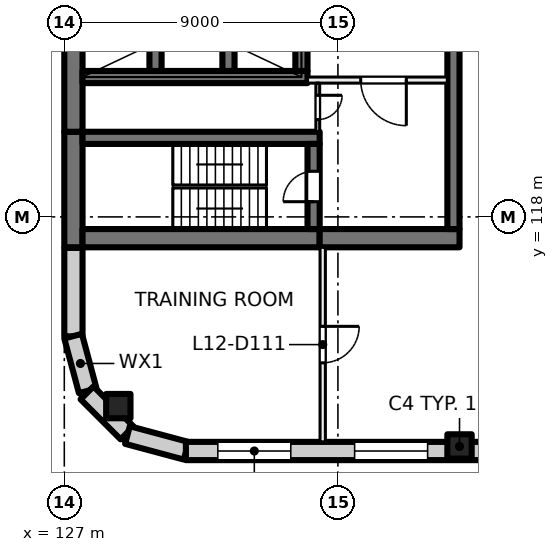
"""IFC4 building model, lengths in metres.
Left out: names, types, materials, properties, quantities, classifications, styles, units other than length and angle.
Written with IfcOpenShell. Run it as: python <this file> out.ifc"""

import sys

from ifc_helpers import new_model, si_unit, direction, frame, frame_2d, origin, origin_2d, place, context, subcontext, project, spatial, rectangle, extrude, element, fill, save


model = new_model("IFC4")
c1 = context("Model", 3, precision=1e-05, world=origin(), true_north=direction((0.0, 1.0)))
c2 = subcontext(c1, "Body", "Model", "MODEL_VIEW")
j1 = project(units=[si_unit("LENGTHUNIT", "METRE"), si_unit("PLANEANGLEUNIT", "RADIAN")], contexts=[c1])
p1 = place(None, origin())
s1 = spatial("IfcSite", under=j1, at=p1, CompositionType="ELEMENT")
p2 = place(p1, origin())
s2 = spatial("IfcBuilding", under=s1, at=p2, CompositionType="ELEMENT")
p3 = place(p2, frame((0.0, 0.0, 55.5)))
s3 = spatial("IfcBuildingStorey", under=s2, at=p3, CompositionType="ELEMENT", Elevation=55.5)
for number, where, z_axis, x_axis in (
    (1, (128.777, 111.777, 0.0), (0.0, 0.0, 1.0), (1.0, 0.0, 0.0)),
    (2, (140.0, 110.45, 0.0), (0.0, 0.0, 1.0), (1.0, 0.0, 0.0)),
):
    element("IfcColumn", number, at=place(p3, frame(where, z_axis=z_axis, x_axis=x_axis)), inside=s3, PredefinedType="COLUMN", context=c2, shape_type="SweptSolid", body=[
        extrude(rectangle(XDim=0.8, YDim=0.8, at=origin_2d()), origin(), (0.0, 0.0, 1.0), 4.0),
    ])
p4 = place(p3, frame((127.3, 117.0, 0.0), z_axis=(0.0, 0.0, 1.0), x_axis=(0.0, 1.0, 0.0)))
e3 = element("IfcWall", 3, at=p4, inside=s3, PredefinedType="SHEAR", context=c2, shape_type="SweptSolid", body=[
    extrude(rectangle(XDim=3.8, YDim=0.6, at=frame_2d((1.9, 0.0))), origin(), (0.0, 0.0, 1.0), 4.0),
])
p5 = place(p3, frame((127.3, 120.8, 0.0), z_axis=(0.0, 0.0, 1.0), x_axis=(0.0, 1.0, 0.0)))
e4 = element("IfcWall", 4, at=p5, inside=s3, PredefinedType="SHEAR", context=c2, shape_type="SweptSolid", body=[
    extrude(rectangle(XDim=14.4, YDim=0.6, at=frame_2d((7.2, 0.0))), origin(), (0.0, 0.0, 1.0), 4.0),
])
p6 = place(p3, frame((127.6, 117.3, 0.0), z_axis=(0.0, 0.0, 1.0), x_axis=(1.0, 0.0, 0.0)))
e5 = element("IfcWall", 5, at=p6, inside=s3, PredefinedType="SHEAR", context=c2, shape_type="SweptSolid", body=[
    extrude(rectangle(XDim=7.8, YDim=0.6, at=frame_2d((3.9, 0.0))), origin(), (0.0, 0.0, 1.0), 4.0),
])
p7 = place(p3, frame((135.4, 117.3, 0.0), z_axis=(0.0, 0.0, 1.0), x_axis=(1.0, 0.0, 0.0)))
e6 = element("IfcWall", 6, at=p7, inside=s3, PredefinedType="SHEAR", context=c2, shape_type="SweptSolid", body=[
    extrude(rectangle(XDim=4.6, YDim=0.6, at=frame_2d((2.3, 0.0))), origin(), (0.0, 0.0, 1.0), 4.0),
])
p8 = place(p3, frame((127.6, 120.6, 0.0), z_axis=(0.0, 0.0, 1.0), x_axis=(1.0, 0.0, 0.0)))
e7 = element("IfcWall", 7, at=p8, inside=s3, PredefinedType="SHEAR", context=c2, shape_type="SweptSolid", body=[
    extrude(rectangle(XDim=7.8, YDim=0.4, at=frame_2d((3.9, 0.0))), origin(), (0.0, 0.0, 1.0), 4.0),
])
p9 = place(p3, frame((135.2, 117.6, 0.0), z_axis=(0.0, 0.0, 1.0), x_axis=(0.0, 1.0, 0.0)))
e8 = element("IfcWall", 8, at=p9, inside=s3, PredefinedType="SHEAR", context=c2, shape_type="SweptSolid", body=[
    extrude(rectangle(XDim=2.8, YDim=0.4, at=frame_2d((1.4, 0.0))), origin(), (0.0, 0.0, 1.0), 4.0),
])
p10 = place(p9, frame((0.9, 0.0, 0.0)))
e9 = element("IfcOpeningElement", 9, at=p10, cuts=e8, PredefinedType="OPENING", context=c2, shape_type="SweptSolid", body=[
    extrude(rectangle(XDim=1.0, YDim=2.1, at=frame_2d((0.5, 1.05))), frame((0.0, 0.21, 0.0), z_axis=(0.0, -1.0, 0.0), x_axis=(1.0, 0.0, 0.0)), (0.0, 0.0, 1.0), 0.42),
])
p11 = place(p3, frame((127.6, 122.6, 0.0), z_axis=(0.0, 0.0, 1.0), x_axis=(1.0, 0.0, 0.0)))
e10 = element("IfcWall", 10, at=p11, inside=s3, PredefinedType="SHEAR", context=c2, shape_type="SweptSolid", body=[
    extrude(rectangle(XDim=7.4, YDim=0.4, at=frame_2d((3.7, 0.0))), origin(), (0.0, 0.0, 1.0), 4.0),
])
for number, where, z_axis, x_axis in (
    (11, (130.0, 122.8, 0.0), (0.0, 0.0, 1.0), (0.0, 1.0, 0.0)),
    (12, (132.4, 122.8, 0.0), (0.0, 0.0, 1.0), (0.0, 1.0, 0.0)),
    (13, (134.8, 122.8, 0.0), (0.0, 0.0, 1.0), (0.0, 1.0, 0.0)),
):
    element("IfcWall", number, at=place(p3, frame(where, z_axis=z_axis, x_axis=x_axis)), inside=s3, PredefinedType="SHEAR", context=c2, shape_type="SweptSolid", body=[
        extrude(rectangle(XDim=3.0, YDim=0.4, at=frame_2d((1.5, 0.0))), origin(), (0.0, 0.0, 1.0), 4.0),
    ])
p12 = place(p3, frame((139.8, 117.6, 0.0), z_axis=(0.0, 0.0, 1.0), x_axis=(0.0, 1.0, 0.0)))
e14 = element("IfcWall", 14, at=p12, inside=s3, PredefinedType="SHEAR", context=c2, shape_type="SweptSolid", body=[
    extrude(rectangle(XDim=8.6, YDim=0.4, at=frame_2d((4.3, 0.0))), origin(), (0.0, 0.0, 1.0), 4.0),
])
p13 = place(p3, frame((127.3, 114.07, 0.0), z_axis=(0.0, 0.0, 1.0), x_axis=(0.0, 1.0, 0.0)))
e15 = element("IfcWall", 15, at=p13, inside=s3, PredefinedType="SOLIDWALL", context=c2, shape_type="SweptSolid", body=[
    extrude(rectangle(XDim=2.91, YDim=0.6, at=frame_2d((1.455, 0.0))), origin(), (0.0, 0.0, 1.0), 3.625),
])
for number, where, z_axis, x_axis in (
    (16, (127.771, 112.281, 0.0), (0.0, 0.0, 1.0), (-0.259, 0.966, 0.0)),
    (17, (129.064, 110.896, 0.0), (0.0, 0.0, 1.0), (-0.707, 0.707, 0.0)),
):
    element("IfcWall", number, at=place(p3, frame(where, z_axis=z_axis, x_axis=x_axis)), inside=s3, PredefinedType="SOLIDWALL", context=c2, shape_type="SweptSolid", body=[
        extrude(rectangle(XDim=1.861, YDim=0.6, at=frame_2d((0.93, 0.0))), origin(), (0.0, 0.0, 1.0), 3.625),
    ])
p14 = place(p3, frame((131.01, 110.308, 0.0), z_axis=(0.0, 0.0, 1.0), x_axis=(-0.965920269068, 0.258839784042, 0.0)))
e18 = element("IfcWall", 18, at=p14, inside=s3, PredefinedType="SOLIDWALL", context=c2, shape_type="SweptSolid", body=[
    extrude(rectangle(XDim=2.0, YDim=0.6, at=frame_2d((1.0, 0.0))), origin(), (0.0, 0.0, 1.0), 3.625),
])
p15 = place(p3, frame((162.93, 110.3, 0.0), z_axis=(0.0, 0.0, 1.0), x_axis=(-1.0, 0.0, 0.0)))
e19 = element("IfcWall", 19, at=p15, inside=s3, PredefinedType="SOLIDWALL", context=c2, shape_type="SweptSolid", body=[
    extrude(rectangle(XDim=31.93, YDim=0.6, at=frame_2d((15.965, 0.0))), origin(), (0.0, 0.0, 1.0), 3.625),
])
p16 = place(p15, frame((1.48, 0.0, 0.9)))
e20 = element("IfcOpeningElement", 20, at=p16, cuts=e19, PredefinedType="OPENING", context=c2, shape_type="SweptSolid", body=[
    extrude(rectangle(XDim=2.4, YDim=2.4, at=frame_2d((1.2, 1.2))), frame((0.0, 0.31, 0.0), z_axis=(0.0, -1.0, 0.0), x_axis=(1.0, 0.0, 0.0)), (0.0, 0.0, 1.0), 0.62),
])
p17 = place(p15, frame((5.98, 0.0, 0.9)))
e21 = element("IfcOpeningElement", 21, at=p17, cuts=e19, PredefinedType="OPENING", context=c2, shape_type="SweptSolid", body=[
    extrude(rectangle(XDim=2.4, YDim=2.4, at=frame_2d((1.2, 1.2))), frame((0.0, 0.31, 0.0), z_axis=(0.0, -1.0, 0.0), x_axis=(1.0, 0.0, 0.0)), (0.0, 0.0, 1.0), 0.62),
])
p18 = place(p15, frame((10.48, 0.0, 0.9)))
e22 = element("IfcOpeningElement", 22, at=p18, cuts=e19, PredefinedType="OPENING", context=c2, shape_type="SweptSolid", body=[
    extrude(rectangle(XDim=2.4, YDim=2.4, at=frame_2d((1.2, 1.2))), frame((0.0, 0.31, 0.0), z_axis=(0.0, -1.0, 0.0), x_axis=(1.0, 0.0, 0.0)), (0.0, 0.0, 1.0), 0.62),
])
p19 = place(p15, frame((14.98, 0.0, 0.9)))
e23 = element("IfcOpeningElement", 23, at=p19, cuts=e19, PredefinedType="OPENING", context=c2, shape_type="SweptSolid", body=[
    extrude(rectangle(XDim=2.4, YDim=2.4, at=frame_2d((1.2, 1.2))), frame((0.0, 0.31, 0.0), z_axis=(0.0, -1.0, 0.0), x_axis=(1.0, 0.0, 0.0)), (0.0, 0.0, 1.0), 0.62),
])
p20 = place(p15, frame((19.48, 0.0, 0.9)))
e24 = element("IfcOpeningElement", 24, at=p20, cuts=e19, PredefinedType="OPENING", context=c2, shape_type="SweptSolid", body=[
    extrude(rectangle(XDim=2.4, YDim=2.4, at=frame_2d((1.2, 1.2))), frame((0.0, 0.31, 0.0), z_axis=(0.0, -1.0, 0.0), x_axis=(1.0, 0.0, 0.0)), (0.0, 0.0, 1.0), 0.62),
])
p21 = place(p15, frame((23.98, 0.0, 0.9)))
e25 = element("IfcOpeningElement", 25, at=p21, cuts=e19, PredefinedType="OPENING", context=c2, shape_type="SweptSolid", body=[
    extrude(rectangle(XDim=2.4, YDim=2.4, at=frame_2d((1.2, 1.2))), frame((0.0, 0.31, 0.0), z_axis=(0.0, -1.0, 0.0), x_axis=(1.0, 0.0, 0.0)), (0.0, 0.0, 1.0), 0.62),
])
p22 = place(p15, frame((28.48, 0.0, 0.9)))
e26 = element("IfcOpeningElement", 26, at=p22, cuts=e19, PredefinedType="OPENING", context=c2, shape_type="SweptSolid", body=[
    extrude(rectangle(XDim=2.4, YDim=2.4, at=frame_2d((1.2, 1.2))), frame((0.0, 0.31, 0.0), z_axis=(0.0, -1.0, 0.0), x_axis=(1.0, 0.0, 0.0)), (0.0, 0.0, 1.0), 0.62),
])
p23 = place(p3, frame((139.6, 122.5, 0.0), z_axis=(0.0, 0.0, 1.0), x_axis=(-1.0, 0.0, 0.0)))
e27 = element("IfcWall", 27, at=p23, inside=s3, PredefinedType="PARTITIONING", context=c2, shape_type="SweptSolid", body=[
    extrude(rectangle(XDim=4.6, YDim=0.2, at=frame_2d((2.3, 0.0))), origin(), (0.0, 0.0, 1.0), 3.625),
])
p24 = place(p23, frame((1.35, 0.0, 0.0)))
e28 = element("IfcOpeningElement", 28, at=p24, cuts=e27, PredefinedType="OPENING", context=c2, shape_type="SweptSolid", body=[
    extrude(rectangle(XDim=1.5, YDim=2.1, at=frame_2d((0.75, 1.05))), frame((0.0, 0.11, 0.0), z_axis=(0.0, -1.0, 0.0), x_axis=(1.0, 0.0, 0.0)), (0.0, 0.0, 1.0), 0.22),
])
p25 = place(p3, frame((135.337, 122.4, 0.0), z_axis=(0.0, 0.0, 1.0), x_axis=(0.0, -1.0, 0.0)))
e29 = element("IfcWall", 29, at=p25, inside=s3, PredefinedType="PARTITIONING", context=c2, shape_type="SweptSolid", body=[
    extrude(rectangle(XDim=1.6, YDim=0.125, at=frame_2d((0.8, 0.0))), origin(), (0.0, 0.0, 1.0), 3.625),
])
p26 = place(p25, frame((0.4, 0.0, 0.0)))
e30 = element("IfcOpeningElement", 30, at=p26, cuts=e29, PredefinedType="OPENING", context=c2, shape_type="SweptSolid", body=[
    extrude(rectangle(XDim=0.8, YDim=2.1, at=frame_2d((0.4, 1.05))), frame((0.0, 0.073, 0.0), z_axis=(0.0, -1.0, 0.0), x_axis=(1.0, 0.0, 0.0)), (0.0, 0.0, 1.0), 0.145),
])
p27 = place(p3, frame((135.5, 117.0, 0.0), z_axis=(0.0, 0.0, 1.0), x_axis=(0.0, -1.0, 0.0)))
e31 = element("IfcWall", 31, at=p27, inside=s3, PredefinedType="PARTITIONING", context=c2, shape_type="SweptSolid", body=[
    extrude(rectangle(XDim=6.4, YDim=0.175, at=frame_2d((3.2, 0.0))), origin(), (0.0, 0.0, 1.0), 3.625),
])
p28 = place(p27, frame((2.6, 0.0, 0.0)))
e32 = element("IfcOpeningElement", 32, at=p28, cuts=e31, PredefinedType="OPENING", context=c2, shape_type="SweptSolid", body=[
    extrude(rectangle(XDim=1.2, YDim=2.1, at=frame_2d((0.6, 1.05))), frame((0.0, 0.097, 0.0), z_axis=(0.0, -1.0, 0.0), x_axis=(1.0, 0.0, 0.0)), (0.0, 0.0, 1.0), 0.195),
])
p29 = place(p21, origin())
e33 = element("IfcWindow", 33, at=p29, inside=s3, PartitioningType="SINGLE_PANEL", PredefinedType="WINDOW", context=c2, shape_type="SweptSolid", body=[
    extrude(rectangle(XDim=2.4, YDim=2.4, at=frame_2d((1.2, 1.2))), frame((0.0, 0.03, 0.0), z_axis=(0.0, -1.0, 0.0), x_axis=(1.0, 0.0, 0.0)), (0.0, 0.0, 1.0), 0.06),
])
fill(e25, e33)
p30 = place(p22, origin())
e34 = element("IfcWindow", 34, at=p30, inside=s3, PartitioningType="SINGLE_PANEL", PredefinedType="WINDOW", context=c2, shape_type="SweptSolid", body=[
    extrude(rectangle(XDim=2.4, YDim=2.4, at=frame_2d((1.2, 1.2))), frame((0.0, 0.03, 0.0), z_axis=(0.0, -1.0, 0.0), x_axis=(1.0, 0.0, 0.0)), (0.0, 0.0, 1.0), 0.06),
])
fill(e26, e34)
p31 = place(p24, origin())
e35 = element("IfcDoor", 35, at=p31, inside=s3, OperationType="DOUBLE_DOOR_SINGLE_SWING", PredefinedType="DOOR", context=c2, shape_type="SweptSolid", body=[
    extrude(rectangle(XDim=1.5, YDim=2.1, at=frame_2d((0.75, 1.05))), frame((0.0, 0.025, 0.0), z_axis=(0.0, -1.0, 0.0), x_axis=(1.0, 0.0, 0.0)), (0.0, 0.0, 1.0), 0.05),
])
fill(e28, e35)
p32 = place(p10, origin())
e36 = element("IfcDoor", 36, at=p32, inside=s3, OperationType="SINGLE_SWING_RIGHT", PredefinedType="DOOR", context=c2, shape_type="SweptSolid", body=[
    extrude(rectangle(XDim=1.0, YDim=2.1, at=frame_2d((0.5, 1.05))), frame((0.0, 0.025, 0.0), z_axis=(0.0, -1.0, 0.0), x_axis=(1.0, 0.0, 0.0)), (0.0, 0.0, 1.0), 0.05),
])
fill(e9, e36)
p33 = place(p26, origin())
e37 = element("IfcDoor", 37, at=p33, inside=s3, OperationType="SINGLE_SWING_LEFT", PredefinedType="DOOR", context=c2, shape_type="SweptSolid", body=[
    extrude(rectangle(XDim=0.8, YDim=2.1, at=frame_2d((0.4, 1.05))), frame((0.0, 0.025, 0.0), z_axis=(0.0, -1.0, 0.0), x_axis=(1.0, 0.0, 0.0)), (0.0, 0.0, 1.0), 0.05),
])
fill(e30, e37)
p34 = place(p28, origin())
e38 = element("IfcDoor", 38, at=p34, inside=s3, OperationType="DOUBLE_DOOR_SINGLE_SWING", PredefinedType="DOOR", context=c2, shape_type="SweptSolid", body=[
    extrude(rectangle(XDim=1.2, YDim=2.1, at=frame_2d((0.6, 1.05))), frame((0.0, 0.025, 0.0), z_axis=(0.0, -1.0, 0.0), x_axis=(1.0, 0.0, 0.0)), (0.0, 0.0, 1.0), 0.05),
])
fill(e32, e38)
save(model, sys.argv[1])
